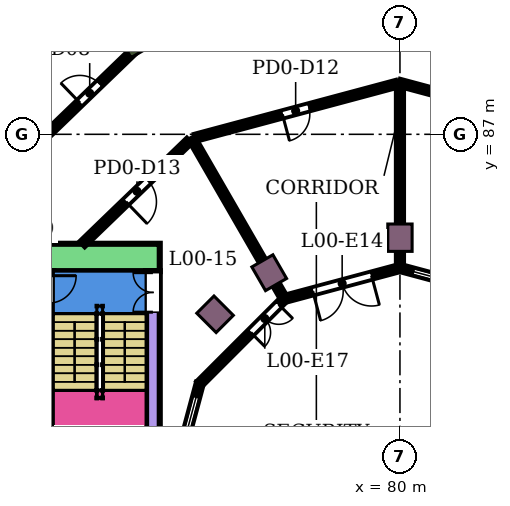
"""IFC4 building model, lengths in metres.
Left out: names, types, materials, properties, quantities, classifications, styles, units other than length and angle.
Written with IfcOpenShell. Run it as: python <this file> out.ifc"""

import sys

from ifc_helpers import new_model, si_unit, direction, frame, frame_2d, origin, origin_2d, place, context, subcontext, project, spatial, rectangle, extrude, element, fill, save


model = new_model("IFC4")
c1 = context("Model", 3, precision=1e-05, world=origin(), true_north=direction((0.0, 1.0)))
c2 = subcontext(c1, "Body", "Model", "MODEL_VIEW")
j1 = project(units=[si_unit("LENGTHUNIT", "METRE"), si_unit("PLANEANGLEUNIT", "RADIAN")], contexts=[c1])
p1 = place(None, origin())
s1 = spatial("IfcSite", under=j1, at=p1, CompositionType="ELEMENT")
p2 = place(p1, origin())
s2 = spatial("IfcBuilding", under=s1, at=p2, CompositionType="ELEMENT")
p3 = place(p2, origin())
s3 = spatial("IfcBuildingStorey", under=s2, at=p3, CompositionType="ELEMENT", Elevation=0.0)
p4 = place(p3, frame((71.2, 90.242, 0.0), z_axis=(0.0, 0.0, 1.0), x_axis=(-0.5, 0.866025403784, 0.0)))
e1 = element("IfcColumn", 1, at=p4, inside=s3, PredefinedType="COLUMN", context=c2, shape_type="SweptSolid", body=[
    extrude(rectangle(XDim=1.2, YDim=0.8, at=origin_2d()), origin(), (0.0, 0.0, 1.0), 7.0),
])
for number, where, z_axis, x_axis in (
    (2, (80.0, 83.6, 0.0), (0.0, 0.0, 1.0), (0.0, 1.0, 0.0)),
    (3, (75.7, 82.448, 0.0), (0.0, 0.0, 1.0), (-0.5, 0.866, 0.0)),
    (4, (73.919, 81.081, 0.0), (0.0, 0.0, 1.0), (-0.707, 0.707, 0.0)),
):
    element("IfcColumn", number, at=place(p3, frame(where, z_axis=z_axis, x_axis=x_axis)), inside=s3, PredefinedType="COLUMN", context=c2, shape_type="SweptSolid", body=[
        extrude(rectangle(XDim=0.9, YDim=0.8, at=origin_2d()), origin(), (0.0, 0.0, 1.0), 7.0),
    ])
p5 = place(p3, frame((72.1, 82.95, 0.0), z_axis=(0.0, 0.0, 1.0), x_axis=(-1.0, 0.0, 0.0)))
e5 = element("IfcWall", 5, at=p5, inside=s3, PredefinedType="SHEAR", context=c2, shape_type="SweptSolid", body=[
    extrude(rectangle(XDim=14.6, YDim=0.9, at=frame_2d((7.3, 0.0))), origin(), (0.0, 0.0, 1.0), 6.55),
])
p6 = place(p5, frame((4.2, 0.0, 0.0)))
e6 = element("IfcOpeningElement", 6, at=p6, cuts=e5, PredefinedType="OPENING", context=c2, shape_type="SweptSolid", body=[
    extrude(rectangle(XDim=2.4, YDim=2.4, at=frame_2d((1.2, 1.2))), frame((0.0, 0.46, 0.0), z_axis=(0.0, -1.0, 0.0), x_axis=(1.0, 0.0, 0.0)), (0.0, 0.0, 1.0), 0.92),
])
p7 = place(p3, frame((71.875, 82.5, 0.0), z_axis=(0.0, 0.0, 1.0), x_axis=(0.0, -1.0, 0.0)))
e7 = element("IfcWall", 7, at=p7, inside=s3, PredefinedType="SHEAR", context=c2, shape_type="SweptSolid", body=[
    extrude(rectangle(XDim=7.5, YDim=0.45, at=frame_2d((3.75, 0.0))), origin(), (0.0, 0.0, 1.0), 6.55),
])
p8 = place(p7, frame((0.05, 0.0, 0.0)))
e8 = element("IfcOpeningElement", 8, at=p8, cuts=e7, PredefinedType="OPENING", context=c2, shape_type="SweptSolid", body=[
    extrude(rectangle(XDim=1.3, YDim=2.4, at=frame_2d((0.65, 1.2))), frame((0.0, 0.235, 0.0), z_axis=(0.0, -1.0, 0.0), x_axis=(1.0, 0.0, 0.0)), (0.0, 0.0, 1.0), 0.47),
])
p9 = place(p3, frame((68.45, 82.5, 0.0), z_axis=(0.0, 0.0, 1.0), x_axis=(0.0, -1.0, 0.0)))
e9 = element("IfcWall", 9, at=p9, inside=s3, PredefinedType="SHEAR", context=c2, shape_type="SweptSolid", body=[
    extrude(rectangle(XDim=7.5, YDim=0.3, at=frame_2d((3.75, 0.0))), origin(), (0.0, 0.0, 1.0), 6.55),
])
p10 = place(p9, frame((0.15, 0.0, 0.0)))
e10 = element("IfcOpeningElement", 10, at=p10, cuts=e9, PredefinedType="OPENING", context=c2, shape_type="SweptSolid", body=[
    extrude(rectangle(XDim=0.9, YDim=2.1, at=frame_2d((0.45, 1.05))), frame((0.0, 0.16, 0.0), z_axis=(0.0, -1.0, 0.0), x_axis=(1.0, 0.0, 0.0)), (0.0, 0.0, 1.0), 0.32),
])
p11 = place(p3, frame((83.802, 81.585, 0.0), z_axis=(0.0, 0.0, 1.0), x_axis=(-0.965933654434, 0.258789828301, 0.0)))
e11 = element("IfcWall", 11, at=p11, inside=s3, PredefinedType="NOTDEFINED", context=c2, shape_type="SweptSolid", body=[
    extrude(rectangle(XDim=3.936, YDim=0.2, at=frame_2d((1.968, 0.0))), origin(), (0.0, 0.0, 1.0), 7.0),
])
p12 = place(p11, frame((0.468, 0.0, 0.9)))
e12 = element("IfcOpeningElement", 12, at=p12, cuts=e11, PredefinedType="OPENING", context=c2, shape_type="SweptSolid", body=[
    extrude(rectangle(XDim=3.0, YDim=2.3, at=frame_2d((1.5, 1.15))), frame((0.0, 0.11, 0.0), z_axis=(0.0, -1.0, 0.0), x_axis=(1.0, 0.0, 0.0)), (0.0, 0.0, 1.0), 0.22),
])
p13 = place(p3, frame((80.0, 82.604, 0.0), z_axis=(0.0, 0.0, 1.0), x_axis=(-0.965933654434, -0.258789828301, 0.0)))
e13 = element("IfcWall", 13, at=p13, inside=s3, PredefinedType="NOTDEFINED", context=c2, shape_type="SweptSolid", body=[
    extrude(rectangle(XDim=3.936, YDim=0.2, at=frame_2d((1.968, 0.0))), origin(), (0.0, 0.0, 1.0), 7.0),
])
p14 = place(p13, frame((0.968, 0.0, 0.0)))
e14 = element("IfcOpeningElement", 14, at=p14, cuts=e13, PredefinedType="OPENING", context=c2, shape_type="SweptSolid", body=[
    extrude(rectangle(XDim=2.0, YDim=2.4, at=frame_2d((1.0, 1.2))), frame((0.0, 0.11, 0.0), z_axis=(0.0, -1.0, 0.0), x_axis=(1.0, 0.0, 0.0)), (0.0, 0.0, 1.0), 0.22),
])
p15 = place(p3, frame((73.415, 78.802, 0.0), z_axis=(0.0, 0.0, 1.0), x_axis=(-0.258789828301, -0.965933654434, 0.0)))
e15 = element("IfcWall", 15, at=p15, inside=s3, PredefinedType="NOTDEFINED", context=c2, shape_type="SweptSolid", body=[
    extrude(rectangle(XDim=3.936, YDim=0.2, at=frame_2d((1.968, 0.0))), origin(), (0.0, 0.0, 1.0), 7.0),
])
p16 = place(p15, frame((0.468, 0.0, 0.9)))
e16 = element("IfcOpeningElement", 16, at=p16, cuts=e15, PredefinedType="OPENING", context=c2, shape_type="SweptSolid", body=[
    extrude(rectangle(XDim=3.0, YDim=2.3, at=frame_2d((1.5, 1.15))), frame((0.0, 0.11, 0.0), z_axis=(0.0, -1.0, 0.0), x_axis=(1.0, 0.0, 0.0)), (0.0, 0.0, 1.0), 0.22),
])
p17 = place(p3, frame((76.198, 81.585, 0.0), z_axis=(0.0, 0.0, 1.0), x_axis=(-0.707106781187, -0.707106781187, 0.0)))
e17 = element("IfcWall", 17, at=p17, inside=s3, PredefinedType="NOTDEFINED", context=c2, shape_type="SweptSolid", body=[
    extrude(rectangle(XDim=3.936, YDim=0.2, at=frame_2d((1.968, 0.0))), origin(), (0.0, 0.0, 1.0), 7.0),
])
p18 = place(p17, frame((0.26, 0.0, 0.0)))
e18 = element("IfcOpeningElement", 18, at=p18, cuts=e17, PredefinedType="OPENING", context=c2, shape_type="SweptSolid", body=[
    extrude(rectangle(XDim=1.3, YDim=2.4, at=frame_2d((0.65, 1.2))), frame((0.0, 0.11, 0.0), z_axis=(0.0, -1.0, 0.0), x_axis=(1.0, 0.0, 0.0)), (0.0, 0.0, 1.0), 0.22),
])
p19 = place(p3, frame((66.22, 84.9, 0.0), z_axis=(0.0, 0.0, 1.0), x_axis=(0.719621348931, 0.694366700068, 0.0)))
e19 = element("IfcWall", 19, at=p19, inside=s3, PredefinedType="PARTITIONING", context=c2, shape_type="SweptSolid", body=[
    extrude(rectangle(XDim=7.173, YDim=0.2, at=frame_2d((3.586, 0.0))), origin(), (0.0, 0.0, 1.0), 6.05),
])
p20 = place(p19, frame((4.519, 0.0, 0.0)))
e20 = element("IfcOpeningElement", 20, at=p20, cuts=e19, PredefinedType="OPENING", context=c2, shape_type="SweptSolid", body=[
    extrude(rectangle(XDim=0.9, YDim=2.1, at=frame_2d((0.45, 1.05))), frame((0.0, 0.11, 0.0), z_axis=(0.0, -1.0, 0.0), x_axis=(1.0, 0.0, 0.0)), (0.0, 0.0, 1.0), 0.22),
])
p21 = place(p19, frame((0.482, 0.0, 0.0)))
e21 = element("IfcOpeningElement", 21, at=p21, cuts=e19, PredefinedType="OPENING", context=c2, shape_type="SweptSolid", body=[
    extrude(rectangle(XDim=1.8, YDim=2.1, at=frame_2d((0.9, 1.05))), frame((0.0, 0.11, 0.0), z_axis=(0.0, -1.0, 0.0), x_axis=(1.0, 0.0, 0.0)), (0.0, 0.0, 1.0), 0.22),
])
p22 = place(p3, frame((69.563, 83.4, 0.0), z_axis=(0.0, 0.0, 1.0), x_axis=(0.719454254864, 0.694539829785, 0.0)))
e22 = element("IfcWall", 22, at=p22, inside=s3, PredefinedType="PARTITIONING", context=c2, shape_type="SweptSolid", body=[
    extrude(rectangle(XDim=4.86, YDim=0.2, at=frame_2d((2.43, 0.0))), origin(), (0.0, 0.0, 1.0), 6.55),
])
p23 = place(p22, frame((1.985, 0.0, 0.0)))
e23 = element("IfcOpeningElement", 23, at=p23, cuts=e22, PredefinedType="OPENING", context=c2, shape_type="SweptSolid", body=[
    extrude(rectangle(XDim=1.0, YDim=2.1, at=frame_2d((0.5, 1.05))), frame((0.0, 0.11, 0.0), z_axis=(0.0, -1.0, 0.0), x_axis=(1.0, 0.0, 0.0)), (0.0, 0.0, 1.0), 0.22),
])
p24 = place(p3, frame((73.284, 86.891, 0.0), z_axis=(0.0, 0.0, 1.0), x_axis=(0.965937351185, 0.258776029775, 0.0)))
e24 = element("IfcWall", 24, at=p24, inside=s3, PredefinedType="PARTITIONING", context=c2, shape_type="SweptSolid", body=[
    extrude(rectangle(XDim=6.823, YDim=0.2, at=frame_2d((3.412, 0.0))), origin(), (0.0, 0.0, 1.0), 6.55),
])
p25 = place(p24, frame((2.951, 0.0, 0.0)))
e25 = element("IfcOpeningElement", 25, at=p25, cuts=e24, PredefinedType="OPENING", context=c2, shape_type="SweptSolid", body=[
    extrude(rectangle(XDim=0.9, YDim=2.1, at=frame_2d((0.45, 1.05))), frame((0.0, 0.11, 0.0), z_axis=(0.0, -1.0, 0.0), x_axis=(1.0, 0.0, 0.0)), (0.0, 0.0, 1.0), 0.22),
])
p26 = place(p3, frame((73.156, 86.856, 0.0), z_axis=(0.0, 0.0, 1.0), x_axis=(0.49984238301, -0.866116384874, 0.0)))
e26 = element("IfcWall", 26, at=p26, inside=s3, PredefinedType="PARTITIONING", context=c2, shape_type="SweptSolid", body=[
    extrude(rectangle(XDim=5.992, YDim=0.2, at=frame_2d((2.996, 0.0))), origin(), (0.0, 0.0, 1.0), 6.55),
])
p27 = place(p3, frame((80.0, 82.699, 0.0), z_axis=(0.0, 0.0, 1.0), x_axis=(0.0, 1.0, 0.0)))
e27 = element("IfcWall", 27, at=p27, inside=s3, PredefinedType="PARTITIONING", context=c2, shape_type="SweptSolid", body=[
    extrude(rectangle(XDim=5.861, YDim=0.2, at=frame_2d((2.931, 0.0))), origin(), (0.0, 0.0, 1.0), 6.55),
])
p28 = place(p3, frame((80.0, 88.69, 0.0), z_axis=(0.0, 0.0, 1.0), x_axis=(0.965929896633, -0.258803853893, 0.0)))
e28 = element("IfcWall", 28, at=p28, inside=s3, PredefinedType="PARTITIONING", context=c2, shape_type="SweptSolid", body=[
    extrude(rectangle(XDim=6.963, YDim=0.2, at=frame_2d((3.481, 0.0))), origin(), (0.0, 0.0, 1.0), 6.55),
])
p29 = place(p28, frame((3.102, 0.0, 0.0)))
e29 = element("IfcOpeningElement", 29, at=p29, cuts=e28, PredefinedType="OPENING", context=c2, shape_type="SweptSolid", body=[
    extrude(rectangle(XDim=0.9, YDim=2.1, at=frame_2d((0.45, 1.05))), frame((0.0, 0.11, 0.0), z_axis=(0.0, -1.0, 0.0), x_axis=(1.0, 0.0, 0.0)), (0.0, 0.0, 1.0), 0.22),
])
p30 = place(p12, origin())
e30 = element("IfcWindow", 30, at=p30, inside=s3, PartitioningType="SINGLE_PANEL", PredefinedType="WINDOW", context=c2, shape_type="SweptSolid", body=[
    extrude(rectangle(XDim=3.0, YDim=2.3, at=frame_2d((1.5, 1.15))), frame((0.0, 0.03, 0.0), z_axis=(0.0, -1.0, 0.0), x_axis=(1.0, 0.0, 0.0)), (0.0, 0.0, 1.0), 0.06),
])
fill(e12, e30)
p31 = place(p14, origin())
e31 = element("IfcDoor", 31, at=p31, inside=s3, OperationType="DOUBLE_DOOR_SINGLE_SWING", PredefinedType="DOOR", context=c2, shape_type="SweptSolid", body=[
    extrude(rectangle(XDim=2.0, YDim=2.4, at=frame_2d((1.0, 1.2))), frame((0.0, 0.025, 0.0), z_axis=(0.0, -1.0, 0.0), x_axis=(1.0, 0.0, 0.0)), (0.0, 0.0, 1.0), 0.05),
])
fill(e14, e31)
p32 = place(p16, origin())
e32 = element("IfcWindow", 32, at=p32, inside=s3, PartitioningType="SINGLE_PANEL", PredefinedType="WINDOW", context=c2, shape_type="SweptSolid", body=[
    extrude(rectangle(XDim=3.0, YDim=2.3, at=frame_2d((1.5, 1.15))), frame((0.0, 0.03, 0.0), z_axis=(0.0, -1.0, 0.0), x_axis=(1.0, 0.0, 0.0)), (0.0, 0.0, 1.0), 0.06),
])
fill(e16, e32)
p33 = place(p18, origin())
e33 = element("IfcDoor", 33, at=p33, inside=s3, OperationType="DOUBLE_DOOR_SINGLE_SWING", PredefinedType="DOOR", context=c2, shape_type="SweptSolid", body=[
    extrude(rectangle(XDim=1.3, YDim=2.4, at=frame_2d((0.65, 1.2))), frame((0.0, 0.025, 0.0), z_axis=(0.0, -1.0, 0.0), x_axis=(1.0, 0.0, 0.0)), (0.0, 0.0, 1.0), 0.05),
])
fill(e18, e33)
p34 = place(p20, origin())
e34 = element("IfcDoor", 34, at=p34, inside=s3, OperationType="SINGLE_SWING_LEFT", PredefinedType="DOOR", context=c2, shape_type="SweptSolid", body=[
    extrude(rectangle(XDim=0.9, YDim=2.1, at=frame_2d((0.45, 1.05))), frame((0.0, 0.025, 0.0), z_axis=(0.0, -1.0, 0.0), x_axis=(1.0, 0.0, 0.0)), (0.0, 0.0, 1.0), 0.05),
])
fill(e20, e34)
p35 = place(p25, frame((0.9, 0.0, 0.0), z_axis=(0.0, 0.0, 1.0), x_axis=(-1.0, 0.0, 0.0)))
e35 = element("IfcDoor", 35, at=p35, inside=s3, OperationType="SINGLE_SWING_RIGHT", PredefinedType="DOOR", context=c2, shape_type="SweptSolid", body=[
    extrude(rectangle(XDim=0.9, YDim=2.1, at=frame_2d((0.45, 1.05))), frame((0.0, 0.025, 0.0), z_axis=(0.0, -1.0, 0.0), x_axis=(1.0, 0.0, 0.0)), (0.0, 0.0, 1.0), 0.05),
])
fill(e25, e35)
p36 = place(p23, frame((1.0, 0.0, 0.0), z_axis=(0.0, 0.0, 1.0), x_axis=(-1.0, 0.0, 0.0)))
e36 = element("IfcDoor", 36, at=p36, inside=s3, OperationType="SINGLE_SWING_RIGHT", PredefinedType="DOOR", context=c2, shape_type="SweptSolid", body=[
    extrude(rectangle(XDim=1.0, YDim=2.1, at=frame_2d((0.5, 1.05))), frame((0.0, 0.025, 0.0), z_axis=(0.0, -1.0, 0.0), x_axis=(1.0, 0.0, 0.0)), (0.0, 0.0, 1.0), 0.05),
])
fill(e23, e36)
p37 = place(p8, frame((1.3, 0.0, 0.0), z_axis=(0.0, 0.0, 1.0), x_axis=(-1.0, 0.0, 0.0)))
e37 = element("IfcDoor", 37, at=p37, inside=s3, OperationType="DOUBLE_DOOR_SINGLE_SWING", PredefinedType="DOOR", context=c2, shape_type="SweptSolid", body=[
    extrude(rectangle(XDim=1.3, YDim=2.4, at=frame_2d((0.65, 1.2))), frame((0.0, 0.025, 0.0), z_axis=(0.0, -1.0, 0.0), x_axis=(1.0, 0.0, 0.0)), (0.0, 0.0, 1.0), 0.05),
])
fill(e8, e37)
save(model, sys.argv[1])
